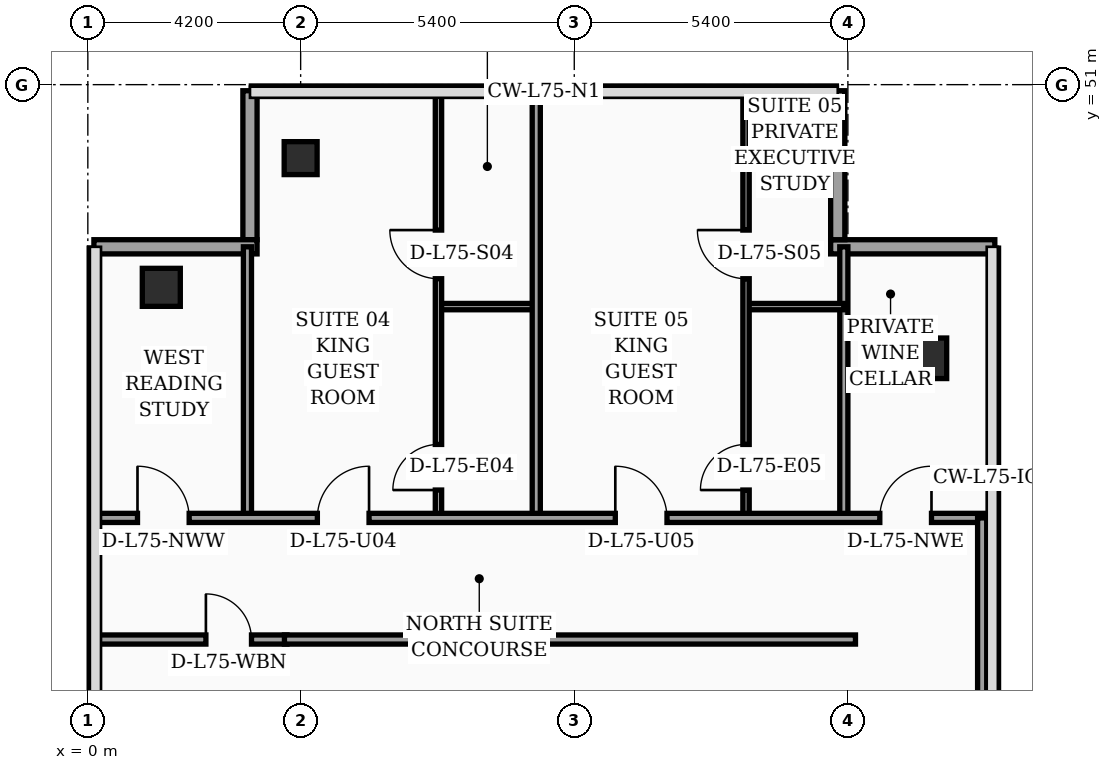
"""IFC4 building model, lengths in metres.
Left out: names, types, materials, properties, quantities, classifications, styles, units other than length and angle.
Written with IfcOpenShell. Run it as: python <this file> out.ifc"""

import sys

from ifc_helpers import new_model, si_unit, direction, frame, frame_2d, origin, origin_2d, place, context, subcontext, project, spatial, rectangle, hollow_rectangle, extrude, element, fill, save


model = new_model("IFC4")
c1 = context("Model", 3, precision=1e-05, world=origin(), true_north=direction((0.0, 1.0)))
c2 = subcontext(c1, "Body", "Model", "MODEL_VIEW")
j1 = project(units=[si_unit("LENGTHUNIT", "METRE"), si_unit("PLANEANGLEUNIT", "RADIAN")], contexts=[c1])
p1 = place(None, origin())
s1 = spatial("IfcSite", under=j1, at=p1, CompositionType="ELEMENT")
p2 = place(p1, origin())
s2 = spatial("IfcBuilding", under=s1, at=p2, CompositionType="ELEMENT")
p3 = place(p2, frame((0.0, 0.0, 302.5)))
s3 = spatial("IfcBuildingStorey", under=s2, at=p3, CompositionType="ELEMENT", Elevation=302.5)
p4 = place(p3, frame((1.45, 47.0, 0.0), z_axis=(0.0, 0.0, 1.0), x_axis=(1.0, 0.0, 0.0)))
e1 = element("IfcColumn", 1, at=p4, inside=s3, PredefinedType="COLUMN", context=c2, shape_type="SweptSolid", body=[
    extrude(hollow_rectangle(XDim=0.75, YDim=0.75, WallThickness=0.032, at=origin_2d()), origin(), (0.0, 0.0, 1.0), 4.05),
])
p5 = place(p3, frame((4.2, 49.55, 0.0), z_axis=(0.0, 0.0, 1.0), x_axis=(1.0, 0.0, 0.0)))
e2 = element("IfcColumn", 2, at=p5, inside=s3, PredefinedType="COLUMN", context=c2, shape_type="SweptSolid", body=[
    extrude(hollow_rectangle(XDim=0.65, YDim=0.65, WallThickness=0.028, at=origin_2d()), origin(), (0.0, 0.0, 1.0), 4.05),
])
p6 = place(p3, frame((16.55, 45.6, 0.0), z_axis=(0.0, 0.0, 1.0), x_axis=(1.0, 0.0, 0.0)))
e3 = element("IfcColumn", 3, at=p6, inside=s3, PredefinedType="COLUMN", context=c2, shape_type="SweptSolid", body=[
    extrude(rectangle(XDim=0.8, YDim=0.8, at=origin_2d()), origin(), (0.0, 0.0, 1.0), 4.05),
])
p7 = place(p3, frame((17.9, 47.8, 0.0), z_axis=(0.0, 0.0, 1.0), x_axis=(-1.0, 0.0, 0.0)))
e4 = element("IfcWall", 4, at=p7, inside=s3, PredefinedType="SOLIDWALL", context=c2, shape_type="SweptSolid", body=[
    extrude(rectangle(XDim=3.24, YDim=0.28, at=frame_2d((1.62, 0.0))), origin(), (0.0, 0.0, 1.0), 4.05),
])
p8 = place(p3, frame((14.8, 47.94, 0.0), z_axis=(0.0, 0.0, 1.0), x_axis=(0.0, 1.0, 0.0)))
e5 = element("IfcWall", 5, at=p8, inside=s3, PredefinedType="SOLIDWALL", context=c2, shape_type="SweptSolid", body=[
    extrude(rectangle(XDim=2.94, YDim=0.28, at=frame_2d((1.47, 0.0))), origin(), (0.0, 0.0, 1.0), 4.05),
])
p9 = place(p3, frame((3.2, 50.88, 0.0), z_axis=(0.0, 0.0, 1.0), x_axis=(0.0, -1.0, 0.0)))
e6 = element("IfcWall", 6, at=p9, inside=s3, PredefinedType="SOLIDWALL", context=c2, shape_type="SweptSolid", body=[
    extrude(rectangle(XDim=2.94, YDim=0.28, at=frame_2d((1.47, 0.0))), origin(), (0.0, 0.0, 1.0), 3.6),
])
p10 = place(p3, frame((3.34, 47.8, 0.0), z_axis=(0.0, 0.0, 1.0), x_axis=(-1.0, 0.0, 0.0)))
e7 = element("IfcWall", 7, at=p10, inside=s3, PredefinedType="SOLIDWALL", context=c2, shape_type="SweptSolid", body=[
    extrude(rectangle(XDim=3.22, YDim=0.28, at=frame_2d((1.61, 0.0))), origin(), (0.0, 0.0, 1.0), 3.6),
])
p11 = place(p3, frame((0.08, 40.05, 0.0), z_axis=(0.0, 0.0, 1.0), x_axis=(1.0, 0.0, 0.0)))
e8 = element("IfcWall", 8, at=p11, inside=s3, PredefinedType="PARTITIONING", context=c2, shape_type="SweptSolid", body=[
    extrude(rectangle(XDim=3.85, YDim=0.18, at=frame_2d((1.925, 0.0))), origin(), (0.0, 0.0, 1.0), 3.5),
])
p12 = place(p11, frame((2.25, 0.0, 0.0)))
e9 = element("IfcOpeningElement", 9, at=p12, cuts=e8, PredefinedType="OPENING", context=c2, shape_type="SweptSolid", body=[
    extrude(rectangle(XDim=0.9, YDim=2.15, at=frame_2d((0.45, 1.075))), frame((0.0, 0.1, 0.0), z_axis=(0.0, -1.0, 0.0), x_axis=(1.0, 0.0, 0.0)), (0.0, 0.0, 1.0), 0.2),
])
p13 = place(p3, frame((3.15, 42.45, 0.0), z_axis=(0.0, 0.0, 1.0), x_axis=(0.0, 1.0, 0.0)))
e10 = element("IfcWall", 10, at=p13, inside=s3, PredefinedType="PARTITIONING", context=c2, shape_type="SweptSolid", body=[
    extrude(rectangle(XDim=5.35, YDim=0.16, at=frame_2d((2.675, 0.0))), origin(), (0.0, 0.0, 1.0), 3.65),
])
p14 = place(p3, frame((14.92, 42.45, 0.0), z_axis=(0.0, 0.0, 1.0), x_axis=(0.0, 1.0, 0.0)))
e11 = element("IfcWall", 11, at=p14, inside=s3, PredefinedType="PARTITIONING", context=c2, shape_type="SweptSolid", body=[
    extrude(rectangle(XDim=5.35, YDim=0.16, at=frame_2d((2.675, 0.0))), origin(), (0.0, 0.0, 1.0), 3.6),
])
p15 = place(p3, frame((6.92, 46.62, 0.0), z_axis=(0.0, 0.0, 1.0), x_axis=(1.0, 0.0, 0.0)))
e12 = element("IfcWall", 12, at=p15, inside=s3, PredefinedType="PARTITIONING", context=c2, shape_type="SweptSolid", body=[
    extrude(rectangle(XDim=1.93, YDim=0.125, at=frame_2d((0.965, 0.0))), origin(), (0.0, 0.0, 1.0), 4.05),
])
p16 = place(p3, frame((6.92, 42.45, 0.0), z_axis=(0.0, 0.0, 1.0), x_axis=(0.0, 1.0, 0.0)))
e13 = element("IfcWall", 13, at=p16, inside=s3, PredefinedType="PARTITIONING", context=c2, shape_type="SweptSolid", body=[
    extrude(rectangle(XDim=8.49, YDim=0.125, at=frame_2d((4.245, 0.0))), origin(), (0.0, 0.0, 1.0), 3.6),
])
p17 = place(p16, frame((0.55, 0.0, 0.0)))
e14 = element("IfcOpeningElement", 14, at=p17, cuts=e13, PredefinedType="OPENING", context=c2, shape_type="SweptSolid", body=[
    extrude(rectangle(XDim=0.9, YDim=2.15, at=frame_2d((0.45, 1.075))), frame((0.0, 0.073, 0.0), z_axis=(0.0, -1.0, 0.0), x_axis=(1.0, 0.0, 0.0)), (0.0, 0.0, 1.0), 0.145),
])
p18 = place(p16, frame((4.72, 0.0, 0.0)))
e15 = element("IfcOpeningElement", 15, at=p18, cuts=e13, PredefinedType="OPENING", context=c2, shape_type="SweptSolid", body=[
    extrude(rectangle(XDim=0.96, YDim=2.2, at=frame_2d((0.48, 1.1))), frame((0.0, 0.073, 0.0), z_axis=(0.0, -1.0, 0.0), x_axis=(1.0, 0.0, 0.0)), (0.0, 0.0, 1.0), 0.145),
])
p19 = place(p3, frame((12.99, 46.62, 0.0), z_axis=(0.0, 0.0, 1.0), x_axis=(1.0, 0.0, 0.0)))
e16 = element("IfcWall", 16, at=p19, inside=s3, PredefinedType="PARTITIONING", context=c2, shape_type="SweptSolid", body=[
    extrude(rectangle(XDim=1.93, YDim=0.125, at=frame_2d((0.965, 0.0))), origin(), (0.0, 0.0, 1.0), 3.6),
])
p20 = place(p3, frame((12.99, 42.45, 0.0), z_axis=(0.0, 0.0, 1.0), x_axis=(0.0, 1.0, 0.0)))
e17 = element("IfcWall", 17, at=p20, inside=s3, PredefinedType="PARTITIONING", context=c2, shape_type="SweptSolid", body=[
    extrude(rectangle(XDim=8.49, YDim=0.125, at=frame_2d((4.245, 0.0))), origin(), (0.0, 0.0, 1.0), 3.6),
])
p21 = place(p20, frame((0.55, 0.0, 0.0)))
e18 = element("IfcOpeningElement", 18, at=p21, cuts=e17, PredefinedType="OPENING", context=c2, shape_type="SweptSolid", body=[
    extrude(rectangle(XDim=0.9, YDim=2.15, at=frame_2d((0.45, 1.075))), frame((0.0, 0.073, 0.0), z_axis=(0.0, -1.0, 0.0), x_axis=(1.0, 0.0, 0.0)), (0.0, 0.0, 1.0), 0.145),
])
p22 = place(p20, frame((4.72, 0.0, 0.0)))
e19 = element("IfcOpeningElement", 19, at=p22, cuts=e17, PredefinedType="OPENING", context=c2, shape_type="SweptSolid", body=[
    extrude(rectangle(XDim=0.96, YDim=2.2, at=frame_2d((0.48, 1.1))), frame((0.0, 0.073, 0.0), z_axis=(0.0, -1.0, 0.0), x_axis=(1.0, 0.0, 0.0)), (0.0, 0.0, 1.0), 0.145),
])
p23 = place(p3, frame((8.85, 42.45, 0.0), z_axis=(0.0, 0.0, 1.0), x_axis=(0.0, 1.0, 0.0)))
e20 = element("IfcWall", 20, at=p23, inside=s3, PredefinedType="PARTITIONING", context=c2, shape_type="SweptSolid", body=[
    extrude(rectangle(XDim=8.49, YDim=0.16, at=frame_2d((4.245, 0.0))), origin(), (0.0, 0.0, 1.0), 3.6),
])
p24 = place(p3, frame((0.08, 42.45, 0.0), z_axis=(0.0, 0.0, 1.0), x_axis=(1.0, 0.0, 0.0)))
e21 = element("IfcWall", 21, at=p24, inside=s3, PredefinedType="PARTITIONING", context=c2, shape_type="SweptSolid", body=[
    extrude(rectangle(XDim=17.77, YDim=0.18, at=frame_2d((8.885, 0.0))), origin(), (0.0, 0.0, 1.0), 3.5),
])
p25 = place(p24, frame((0.9, 0.0, 0.0)))
e22 = element("IfcOpeningElement", 22, at=p25, cuts=e21, PredefinedType="OPENING", context=c2, shape_type="SweptSolid", body=[
    extrude(rectangle(XDim=1.02, YDim=2.2, at=frame_2d((0.51, 1.1))), frame((0.0, 0.1, 0.0), z_axis=(0.0, -1.0, 0.0), x_axis=(1.0, 0.0, 0.0)), (0.0, 0.0, 1.0), 0.2),
])
p26 = place(p24, frame((4.45, 0.0, 0.0)))
e23 = element("IfcOpeningElement", 23, at=p26, cuts=e21, PredefinedType="OPENING", context=c2, shape_type="SweptSolid", body=[
    extrude(rectangle(XDim=1.02, YDim=2.2, at=frame_2d((0.51, 1.1))), frame((0.0, 0.1, 0.0), z_axis=(0.0, -1.0, 0.0), x_axis=(1.0, 0.0, 0.0)), (0.0, 0.0, 1.0), 0.2),
])
p27 = place(p24, frame((10.33, 0.0, 0.0)))
e24 = element("IfcOpeningElement", 24, at=p27, cuts=e21, PredefinedType="OPENING", context=c2, shape_type="SweptSolid", body=[
    extrude(rectangle(XDim=1.02, YDim=2.2, at=frame_2d((0.51, 1.1))), frame((0.0, 0.1, 0.0), z_axis=(0.0, -1.0, 0.0), x_axis=(1.0, 0.0, 0.0)), (0.0, 0.0, 1.0), 0.2),
])
p28 = place(p24, frame((15.55, 0.0, 0.0)))
e25 = element("IfcOpeningElement", 25, at=p28, cuts=e21, PredefinedType="OPENING", context=c2, shape_type="SweptSolid", body=[
    extrude(rectangle(XDim=1.02, YDim=2.2, at=frame_2d((0.51, 1.1))), frame((0.0, 0.1, 0.0), z_axis=(0.0, -1.0, 0.0), x_axis=(1.0, 0.0, 0.0)), (0.0, 0.0, 1.0), 0.2),
])
p29 = place(p3, frame((17.65, 24.3, 0.0), z_axis=(0.0, 0.0, 1.0), x_axis=(0.0, 1.0, 0.0)))
e26 = element("IfcWall", 26, at=p29, inside=s3, PredefinedType="PARTITIONING", context=c2, shape_type="SweptSolid", body=[
    extrude(rectangle(XDim=18.15, YDim=0.18, at=frame_2d((9.075, 0.0))), origin(), (0.0, 0.0, 1.0), 3.5),
])
p30 = place(p29, frame((3.2, 0.0, 0.0)))
e27 = element("IfcOpeningElement", 27, at=p30, cuts=e26, PredefinedType="OPENING", context=c2, shape_type="SweptSolid", body=[
    extrude(rectangle(XDim=1.02, YDim=2.2, at=frame_2d((0.51, 1.1))), frame((0.0, 0.1, 0.0), z_axis=(0.0, -1.0, 0.0), x_axis=(1.0, 0.0, 0.0)), (0.0, 0.0, 1.0), 0.2),
])
p31 = place(p3, frame((3.88, 40.05, 0.0), z_axis=(0.0, 0.0, 1.0), x_axis=(1.0, 0.0, 0.0)))
e28 = element("IfcWall", 28, at=p31, inside=s3, PredefinedType="PARTITIONING", context=c2, shape_type="SweptSolid", body=[
    extrude(rectangle(XDim=11.27, YDim=0.18, at=frame_2d((5.635, 0.0))), origin(), (0.0, 0.0, 1.0), 3.5),
])
p32 = place(p12, origin())
e29 = element("IfcDoor", 29, at=p32, inside=s3, OperationType="SINGLE_SWING_LEFT", PredefinedType="DOOR", context=c2, shape_type="SweptSolid", body=[
    extrude(rectangle(XDim=0.9, YDim=2.15, at=frame_2d((0.45, 1.075))), frame((0.0, 0.025, 0.0), z_axis=(0.0, -1.0, 0.0), x_axis=(1.0, 0.0, 0.0)), (0.0, 0.0, 1.0), 0.05),
])
fill(e9, e29)
p33 = place(p17, origin())
e30 = element("IfcDoor", 30, at=p33, inside=s3, OperationType="SINGLE_SWING_LEFT", PredefinedType="DOOR", context=c2, shape_type="SweptSolid", body=[
    extrude(rectangle(XDim=0.9, YDim=2.15, at=frame_2d((0.45, 1.075))), frame((0.0, 0.025, 0.0), z_axis=(0.0, -1.0, 0.0), x_axis=(1.0, 0.0, 0.0)), (0.0, 0.0, 1.0), 0.05),
])
fill(e14, e30)
p34 = place(p18, origin())
e31 = element("IfcDoor", 31, at=p34, inside=s3, OperationType="SINGLE_SWING_RIGHT", PredefinedType="DOOR", context=c2, shape_type="SweptSolid", body=[
    extrude(rectangle(XDim=0.96, YDim=2.2, at=frame_2d((0.48, 1.1))), frame((0.0, 0.025, 0.0), z_axis=(0.0, -1.0, 0.0), x_axis=(1.0, 0.0, 0.0)), (0.0, 0.0, 1.0), 0.05),
])
fill(e15, e31)
p35 = place(p21, origin())
e32 = element("IfcDoor", 32, at=p35, inside=s3, OperationType="SINGLE_SWING_LEFT", PredefinedType="DOOR", context=c2, shape_type="SweptSolid", body=[
    extrude(rectangle(XDim=0.9, YDim=2.15, at=frame_2d((0.45, 1.075))), frame((0.0, 0.025, 0.0), z_axis=(0.0, -1.0, 0.0), x_axis=(1.0, 0.0, 0.0)), (0.0, 0.0, 1.0), 0.05),
])
fill(e18, e32)
p36 = place(p22, origin())
e33 = element("IfcDoor", 33, at=p36, inside=s3, OperationType="SINGLE_SWING_RIGHT", PredefinedType="DOOR", context=c2, shape_type="SweptSolid", body=[
    extrude(rectangle(XDim=0.96, YDim=2.2, at=frame_2d((0.48, 1.1))), frame((0.0, 0.025, 0.0), z_axis=(0.0, -1.0, 0.0), x_axis=(1.0, 0.0, 0.0)), (0.0, 0.0, 1.0), 0.05),
])
fill(e19, e33)
p37 = place(p25, origin())
e34 = element("IfcDoor", 34, at=p37, inside=s3, OperationType="SINGLE_SWING_LEFT", PredefinedType="DOOR", context=c2, shape_type="SweptSolid", body=[
    extrude(rectangle(XDim=1.02, YDim=2.2, at=frame_2d((0.51, 1.1))), frame((0.0, 0.025, 0.0), z_axis=(0.0, -1.0, 0.0), x_axis=(1.0, 0.0, 0.0)), (0.0, 0.0, 1.0), 0.05),
])
fill(e22, e34)
p38 = place(p26, origin())
e35 = element("IfcDoor", 35, at=p38, inside=s3, OperationType="SINGLE_SWING_RIGHT", PredefinedType="DOOR", context=c2, shape_type="SweptSolid", body=[
    extrude(rectangle(XDim=1.02, YDim=2.2, at=frame_2d((0.51, 1.1))), frame((0.0, 0.025, 0.0), z_axis=(0.0, -1.0, 0.0), x_axis=(1.0, 0.0, 0.0)), (0.0, 0.0, 1.0), 0.05),
])
fill(e23, e35)
p39 = place(p27, origin())
e36 = element("IfcDoor", 36, at=p39, inside=s3, OperationType="SINGLE_SWING_LEFT", PredefinedType="DOOR", context=c2, shape_type="SweptSolid", body=[
    extrude(rectangle(XDim=1.02, YDim=2.2, at=frame_2d((0.51, 1.1))), frame((0.0, 0.025, 0.0), z_axis=(0.0, -1.0, 0.0), x_axis=(1.0, 0.0, 0.0)), (0.0, 0.0, 1.0), 0.05),
])
fill(e24, e36)
p40 = place(p28, origin())
e37 = element("IfcDoor", 37, at=p40, inside=s3, OperationType="SINGLE_SWING_RIGHT", PredefinedType="DOOR", context=c2, shape_type="SweptSolid", body=[
    extrude(rectangle(XDim=1.02, YDim=2.2, at=frame_2d((0.51, 1.1))), frame((0.0, 0.025, 0.0), z_axis=(0.0, -1.0, 0.0), x_axis=(1.0, 0.0, 0.0)), (0.0, 0.0, 1.0), 0.05),
])
fill(e25, e37)
save(model, sys.argv[1])
